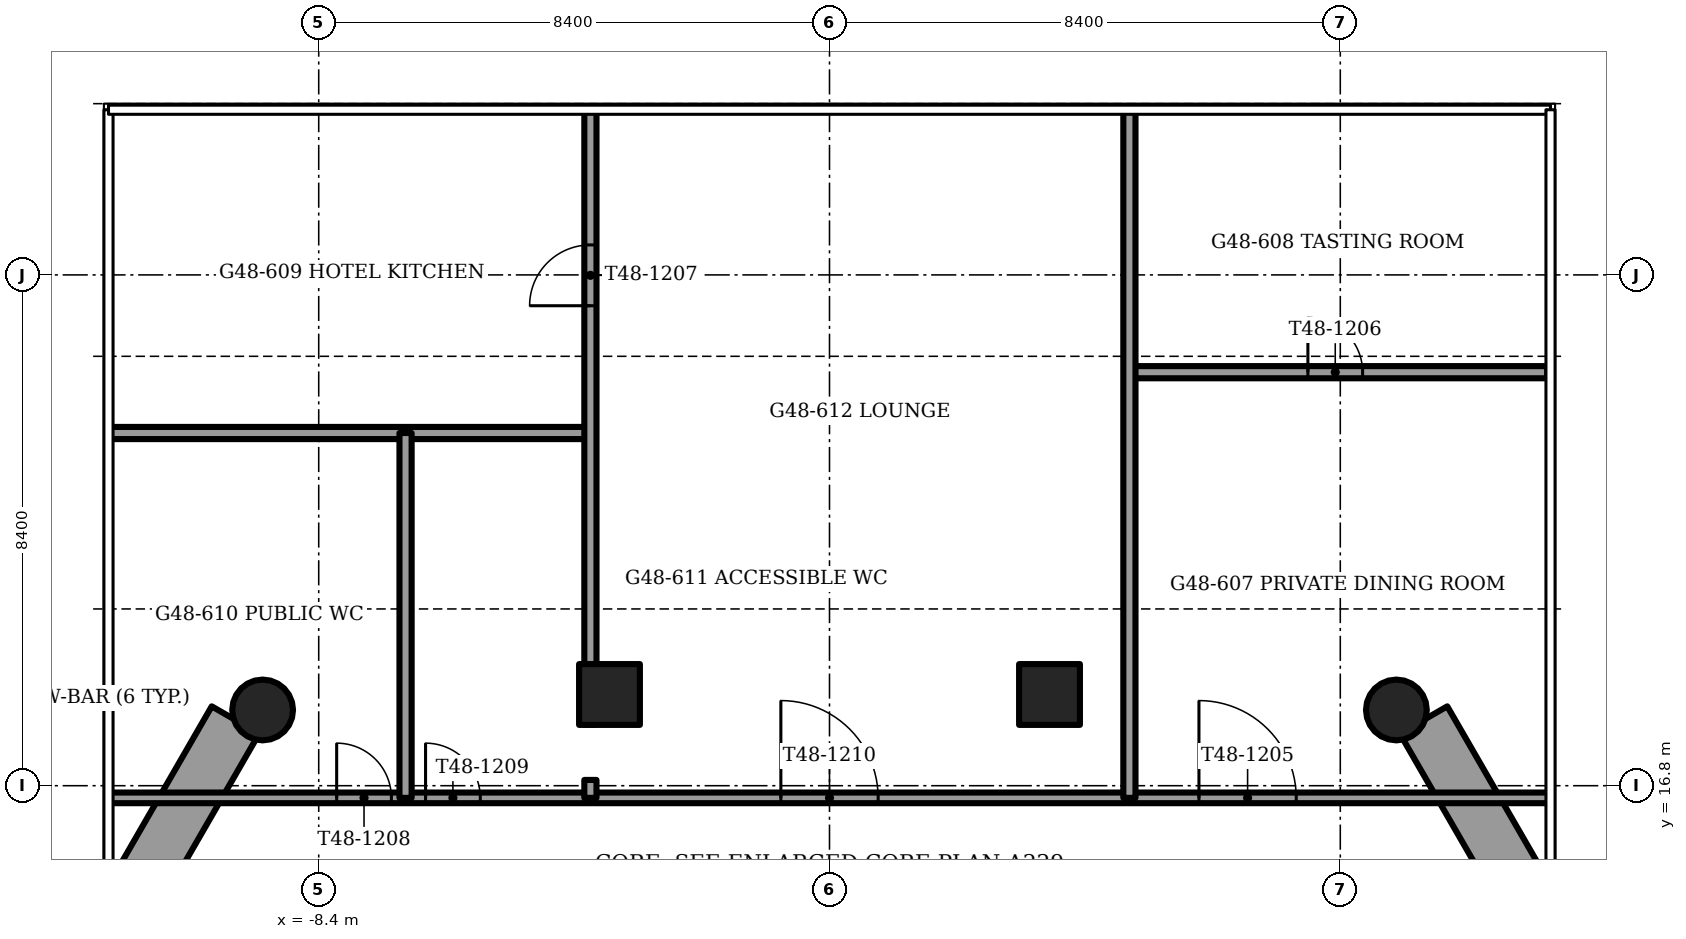
"""IFC4 building model, lengths in metres.
Left out: names, types, materials, properties, quantities, classifications, styles, units other than length and angle.
Written with IfcOpenShell. Run it as: python <this file> out.ifc"""

import sys

from ifc_helpers import new_model, si_unit, direction, frame, frame_2d, origin, origin_2d, place, context, subcontext, project, spatial, rectangle, circle, extrude, element, fill, save


model = new_model("IFC4")
c1 = context("Model", 3, precision=1e-05, world=origin(), true_north=direction((0.0, 1.0)))
c2 = subcontext(c1, "Body", "Model", "MODEL_VIEW")
j1 = project(units=[si_unit("LENGTHUNIT", "METRE"), si_unit("PLANEANGLEUNIT", "RADIAN")], contexts=[c1])
p1 = place(None, origin())
s1 = spatial("IfcSite", under=j1, at=p1, CompositionType="ELEMENT")
p2 = place(p1, origin())
s2 = spatial("IfcBuilding", under=s1, at=p2, CompositionType="ELEMENT")
p3 = place(p2, frame((0.0, 0.0, 194.5)))
s3 = spatial("IfcBuildingStorey", under=s2, at=p3, CompositionType="ELEMENT", Elevation=194.5)
for number, where, z_axis, x_axis in (
    (1, (-9.323, 18.045, -1.2), (0.0, 0.0, 1.0), (1.0, 0.0, 0.0)),
    (2, (9.323, 18.045, -1.2), (0.0, 0.0, 1.0), (1.0, 0.0, 0.0)),
):
    element("IfcColumn", number, at=place(p3, frame(where, z_axis=z_axis, x_axis=x_axis)), inside=s3, PredefinedType="COLUMN", context=c2, shape_type="SweptSolid", body=[
        extrude(circle(Radius=0.5, at=origin_2d()), origin(), (0.0, 0.0, 1.0), 3.75),
    ])
for number, where, z_axis, x_axis in (
    (3, (3.618, 18.3, -1.2), (0.0, 0.0, 1.0), (1.0, 0.0, 0.0)),
    (4, (-3.618, 18.3, -1.2), (0.0, 0.0, 1.0), (1.0, 0.0, 0.0)),
):
    element("IfcColumn", number, at=place(p3, frame(where, z_axis=z_axis, x_axis=x_axis)), inside=s3, PredefinedType="COLUMN", context=c2, shape_type="SweptSolid", body=[
        extrude(rectangle(XDim=1.0, YDim=1.0, at=origin_2d()), origin(), (0.0, 0.0, 1.0), 3.75),
    ])
for number, where, z_axis, x_axis in (
    (5, (-9.77, 17.88, 0.0), (0.0, 0.0, 1.0), (-0.5, -0.866, 0.0)),
    (6, (13.025, 12.241, 0.0), (0.0, 0.0, 1.0), (-0.5, 0.866, 0.0)),
):
    element("IfcWall", number, at=place(p3, frame(where, z_axis=z_axis, x_axis=x_axis)), inside=s3, PredefinedType="PARAPET", context=c2, shape_type="SweptSolid", body=[
        extrude(rectangle(XDim=6.512, YDim=0.9, at=frame_2d((3.256, 0.0))), origin(), (0.0, 0.0, 1.0), 1.1),
    ])
p4 = place(p3, frame((-11.838, 16.6, 0.0), z_axis=(0.0, 0.0, 1.0), x_axis=(1.0, 0.0, 0.0)))
e7 = element("IfcWall", 7, at=p4, inside=s3, PredefinedType="PARTITIONING", context=c2, shape_type="SweptSolid", body=[
    extrude(rectangle(XDim=23.676, YDim=0.175, at=frame_2d((11.838, 0.0))), origin(), (0.0, 0.0, 1.0), 2.25),
])
p5 = place(p4, frame((17.914, 0.0, 0.0)))
e8 = element("IfcOpeningElement", 8, at=p5, cuts=e7, PredefinedType="OPENING", context=c2, shape_type="SweptSolid", body=[
    extrude(rectangle(XDim=1.6, YDim=2.1, at=frame_2d((0.8, 1.05))), frame((0.0, 0.087, 0.0), z_axis=(0.0, -1.0, 0.0), x_axis=(1.0, 0.0, 0.0)), (0.0, 0.0, 1.0), 0.175),
])
p6 = place(p4, frame((3.733, 0.0, 0.0)))
e9 = element("IfcOpeningElement", 9, at=p6, cuts=e7, PredefinedType="OPENING", context=c2, shape_type="SweptSolid", body=[
    extrude(rectangle(XDim=0.9, YDim=2.1, at=frame_2d((0.45, 1.05))), frame((0.0, 0.087, 0.0), z_axis=(0.0, -1.0, 0.0), x_axis=(1.0, 0.0, 0.0)), (0.0, 0.0, 1.0), 0.175),
])
p7 = place(p4, frame((5.195, 0.0, 0.0)))
e10 = element("IfcOpeningElement", 10, at=p7, cuts=e7, PredefinedType="OPENING", context=c2, shape_type="SweptSolid", body=[
    extrude(rectangle(XDim=0.9, YDim=2.1, at=frame_2d((0.45, 1.05))), frame((0.0, 0.087, 0.0), z_axis=(0.0, -1.0, 0.0), x_axis=(1.0, 0.0, 0.0)), (0.0, 0.0, 1.0), 0.175),
])
p8 = place(p4, frame((11.038, 0.0, 0.0)))
e11 = element("IfcOpeningElement", 11, at=p8, cuts=e7, PredefinedType="OPENING", context=c2, shape_type="SweptSolid", body=[
    extrude(rectangle(XDim=1.6, YDim=2.1, at=frame_2d((0.8, 1.05))), frame((0.0, 0.087, 0.0), z_axis=(0.0, -1.0, 0.0), x_axis=(1.0, 0.0, 0.0)), (0.0, 0.0, 1.0), 0.175),
])
p9 = place(p3, frame((-11.838, 22.6, 0.0), z_axis=(0.0, 0.0, 1.0), x_axis=(1.0, 0.0, 0.0)))
e12 = element("IfcWall", 12, at=p9, inside=s3, PredefinedType="PARTITIONING", context=c2, shape_type="SweptSolid", body=[
    extrude(rectangle(XDim=7.906, YDim=0.2, at=frame_2d((3.953, 0.0))), origin(), (0.0, 0.0, 1.0), 3.45),
])
p10 = place(p3, frame((4.932, 23.6, 0.0), z_axis=(0.0, 0.0, 1.0), x_axis=(1.0, 0.0, 0.0)))
e13 = element("IfcWall", 13, at=p10, inside=s3, PredefinedType="PARTITIONING", context=c2, shape_type="SweptSolid", body=[
    extrude(rectangle(XDim=6.87, YDim=0.2, at=frame_2d((3.435, 0.0))), origin(), (0.0, 0.0, 1.0), 2.839),
])
p11 = place(p10, frame((2.935, 0.0, 0.0)))
e14 = element("IfcOpeningElement", 14, at=p11, cuts=e13, PredefinedType="OPENING", context=c2, shape_type="SweptSolid", body=[
    extrude(rectangle(XDim=0.9, YDim=2.1, at=frame_2d((0.45, 1.05))), frame((0.0, 0.1, 0.0), z_axis=(0.0, -1.0, 0.0), x_axis=(1.0, 0.0, 0.0)), (0.0, 0.0, 1.0), 0.2),
])
p12 = place(p3, frame((-6.972, 16.6, 0.0), z_axis=(0.0, 0.0, 1.0), x_axis=(0.0, 1.0, 0.0)))
e15 = element("IfcWall", 15, at=p12, inside=s3, PredefinedType="PARTITIONING", context=c2, shape_type="SweptSolid", body=[
    extrude(rectangle(XDim=6.0, YDim=0.2, at=frame_2d((3.0, 0.0))), origin(), (0.0, 0.0, 1.0), 2.839),
])
p13 = place(p3, frame((-3.932, 16.6, 0.0), z_axis=(0.0, 0.0, 1.0), x_axis=(0.0, 1.0, 0.0)))
e16 = element("IfcWall", 16, at=p13, inside=s3, PredefinedType="PARTITIONING", context=c2, shape_type="SweptSolid", body=[
    extrude(rectangle(XDim=0.295, YDim=0.2, at=frame_2d((0.147, 0.0))), origin(), (0.0, 0.0, 1.0), 3.45),
])
p14 = place(p3, frame((-3.932, 17.807, 0.0), z_axis=(0.0, 0.0, 1.0), x_axis=(0.0, 1.0, 0.0)))
e17 = element("IfcWall", 17, at=p14, inside=s3, PredefinedType="PARTITIONING", context=c2, shape_type="SweptSolid", body=[
    extrude(rectangle(XDim=10.091, YDim=0.2, at=frame_2d((5.045, 0.0))), origin(), (0.0, 0.0, 1.0), 2.839),
])
p15 = place(p14, frame((6.886, 0.0, 0.0)))
e18 = element("IfcOpeningElement", 18, at=p15, cuts=e17, PredefinedType="OPENING", context=c2, shape_type="SweptSolid", body=[
    extrude(rectangle(XDim=1.0, YDim=2.1, at=frame_2d((0.5, 1.05))), frame((0.0, 0.1, 0.0), z_axis=(0.0, -1.0, 0.0), x_axis=(1.0, 0.0, 0.0)), (0.0, 0.0, 1.0), 0.2),
])
p16 = place(p3, frame((4.932, 16.6, 0.0), z_axis=(0.0, 0.0, 1.0), x_axis=(0.0, 1.0, 0.0)))
e19 = element("IfcWall", 19, at=p16, inside=s3, PredefinedType="PARTITIONING", context=c2, shape_type="SweptSolid", body=[
    extrude(rectangle(XDim=11.297, YDim=0.2, at=frame_2d((5.648, 0.0))), origin(), (0.0, 0.0, 1.0), 2.839),
])
p17 = place(p5, origin())
e20 = element("IfcDoor", 20, at=p17, inside=s3, OperationType="DOUBLE_DOOR_SINGLE_SWING", PredefinedType="DOOR", context=c2, shape_type="SweptSolid", body=[
    extrude(rectangle(XDim=1.6, YDim=2.1, at=frame_2d((0.8, 1.05))), frame((0.0, 0.025, 0.0), z_axis=(0.0, -1.0, 0.0), x_axis=(1.0, 0.0, 0.0)), (0.0, 0.0, 1.0), 0.05),
])
fill(e8, e20)
p18 = place(p11, origin())
e21 = element("IfcDoor", 21, at=p18, inside=s3, OperationType="SINGLE_SWING_RIGHT", PredefinedType="DOOR", context=c2, shape_type="SweptSolid", body=[
    extrude(rectangle(XDim=0.9, YDim=2.1, at=frame_2d((0.45, 1.05))), frame((0.0, 0.025, 0.0), z_axis=(0.0, -1.0, 0.0), x_axis=(1.0, 0.0, 0.0)), (0.0, 0.0, 1.0), 0.05),
])
fill(e14, e21)
p19 = place(p15, origin())
e22 = element("IfcDoor", 22, at=p19, inside=s3, OperationType="SINGLE_SWING_LEFT", PredefinedType="DOOR", context=c2, shape_type="SweptSolid", body=[
    extrude(rectangle(XDim=1.0, YDim=2.1, at=frame_2d((0.5, 1.05))), frame((0.0, 0.025, 0.0), z_axis=(0.0, -1.0, 0.0), x_axis=(1.0, 0.0, 0.0)), (0.0, 0.0, 1.0), 0.05),
])
fill(e18, e22)
p20 = place(p6, origin())
e23 = element("IfcDoor", 23, at=p20, inside=s3, OperationType="SINGLE_SWING_RIGHT", PredefinedType="DOOR", context=c2, shape_type="SweptSolid", body=[
    extrude(rectangle(XDim=0.9, YDim=2.1, at=frame_2d((0.45, 1.05))), frame((0.0, 0.025, 0.0), z_axis=(0.0, -1.0, 0.0), x_axis=(1.0, 0.0, 0.0)), (0.0, 0.0, 1.0), 0.05),
])
fill(e9, e23)
p21 = place(p7, origin())
e24 = element("IfcDoor", 24, at=p21, inside=s3, OperationType="SINGLE_SWING_LEFT", PredefinedType="DOOR", context=c2, shape_type="SweptSolid", body=[
    extrude(rectangle(XDim=0.9, YDim=2.1, at=frame_2d((0.45, 1.05))), frame((0.0, 0.025, 0.0), z_axis=(0.0, -1.0, 0.0), x_axis=(1.0, 0.0, 0.0)), (0.0, 0.0, 1.0), 0.05),
])
fill(e10, e24)
p22 = place(p8, origin())
e25 = element("IfcDoor", 25, at=p22, inside=s3, OperationType="DOUBLE_DOOR_SINGLE_SWING", PredefinedType="DOOR", context=c2, shape_type="SweptSolid", body=[
    extrude(rectangle(XDim=1.6, YDim=2.1, at=frame_2d((0.8, 1.05))), frame((0.0, 0.025, 0.0), z_axis=(0.0, -1.0, 0.0), x_axis=(1.0, 0.0, 0.0)), (0.0, 0.0, 1.0), 0.05),
])
fill(e11, e25)
save(model, sys.argv[1])
